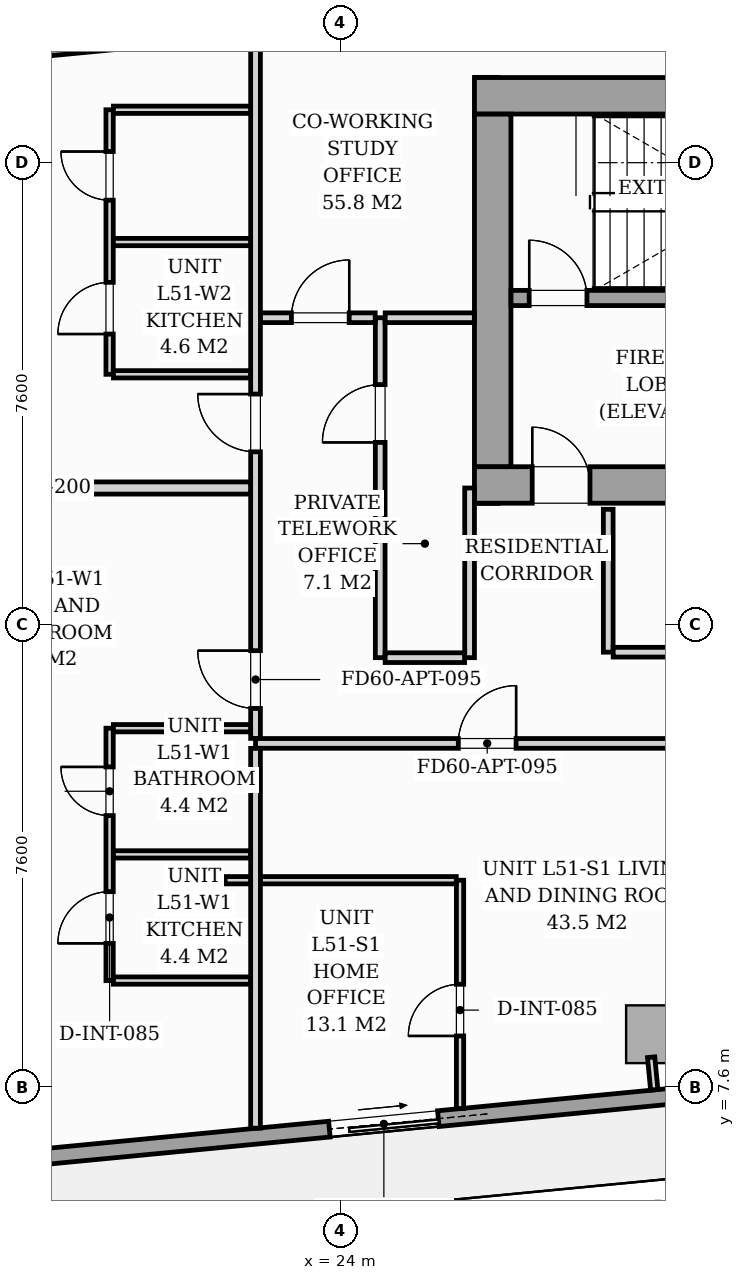
"""IFC4 building model, lengths in metres.
Left out: names, types, materials, properties, quantities, classifications, styles, units other than length and angle.
Written with IfcOpenShell. Run it as: python <this file> out.ifc"""

import sys

from ifc_helpers import new_model, si_unit, direction, frame, frame_2d, origin, origin_2d, place, context, subcontext, project, spatial, rectangle, i_section, extrude, source, transform, mapped, element, fill, save


model = new_model("IFC4")
c1 = context("Model", 3, precision=1e-05, world=origin(), true_north=direction((0.0, 1.0)))
c2 = subcontext(c1, "Body", "Model", "MODEL_VIEW")
j1 = project(units=[si_unit("LENGTHUNIT", "METRE"), si_unit("PLANEANGLEUNIT", "RADIAN")], contexts=[c1])
p1 = place(None, origin())
s1 = spatial("IfcSite", under=j1, at=p1, CompositionType="ELEMENT")
p2 = place(p1, origin())
s2 = spatial("IfcBuilding", under=s1, at=p2, CompositionType="ELEMENT")
p3 = place(p2, frame((0.0, 0.0, 179.4)))
s3 = spatial("IfcBuildingStorey", under=s2, at=p3, CompositionType="ELEMENT", Elevation=179.4)
m1 = source(origin(), c2, "Body", "SweptSolid", [
    extrude(i_section(OverallWidth=0.416, OverallDepth=0.446, WebThickness=0.039, FlangeThickness=0.063, FilletRadius=0.018, at=origin_2d()), origin(), (0.0, 0.0, 1.0), 3.196),
])
for number, where, z_axis, x_axis in (
    (1, (26.4, 17.4, 0.002), (0.0, 0.0, 1.0), (1.0, 0.0, 0.0)),
    (2, (26.4, 24.0, 0.002), (0.0, 0.0, 1.0), (1.0, 0.0, 0.0)),
):
    element("IfcColumn", number, at=place(p3, frame(where, z_axis=z_axis, x_axis=x_axis)), inside=s3, PredefinedType="PILASTER", context=c2, shape_type="MappedRepresentation", body=[
        mapped(m1, transform((0.0, 0.0, 0.0), scale=1.0)),
    ])
m2 = source(origin(), c2, "Body", "SweptSolid", [
    extrude(rectangle(XDim=0.75, YDim=0.95, at=origin_2d()), origin(), (0.0, 0.0, 1.0), 3.196),
])
p4 = place(p3, frame((29.069, 8.467, 0.002), z_axis=(0.0, 0.0, 1.0), x_axis=(0.995396198367, 0.09584575252, 0.0)))
e3 = element("IfcColumn", 3, at=p4, inside=s3, PredefinedType="COLUMN", context=c2, shape_type="MappedRepresentation", body=[
    mapped(m2, transform((0.0, 0.0, 0.0), scale=1.0)),
])
p5 = place(p3, frame((15.437, 24.324, 0.0), z_axis=(0.0, 0.0, 1.0), x_axis=(0.995395627913, 0.095851676732, 0.0)))
e4 = element("IfcWall", 4, at=p5, inside=s3, PredefinedType="STANDARD", context=c2, shape_type="SweptSolid", body=[
    extrude(rectangle(XDim=16.1, YDim=0.26, at=frame_2d((8.05, 0.0))), origin(), (0.0, 0.0, 1.0), 2.94),
])
p6 = place(p5, frame((7.589, 0.0, 0.0)))
e5 = element("IfcOpeningElement", 5, at=p6, cuts=e4, PredefinedType="OPENING", context=c2, shape_type="SweptSolid", body=[
    extrude(rectangle(XDim=1.8, YDim=2.06, at=frame_2d((0.9, 1.03))), frame((0.0, 0.14, 0.0), z_axis=(0.0, -1.0, 0.0), x_axis=(1.0, 0.0, 0.0)), (0.0, 0.0, 1.0), 0.28),
])
p7 = place(p5, frame((2.05, 0.0, 0.65)))
e6 = element("IfcOpeningElement", 6, at=p7, cuts=e4, PredefinedType="OPENING", context=c2, shape_type="SweptSolid", body=[
    extrude(rectangle(XDim=1.6, YDim=1.5, at=frame_2d((0.8, 0.75))), frame((0.0, 0.14, 0.0), z_axis=(0.0, -1.0, 0.0), x_axis=(1.0, 0.0, 0.0)), (0.0, 0.0, 1.0), 0.28),
])
p8 = place(p3, frame((33.201, 7.81, 0.0), z_axis=(0.0, 0.0, 1.0), x_axis=(-0.995397074604, -0.095836652014, 0.0)))
e7 = element("IfcWall", 7, at=p8, inside=s3, PredefinedType="STANDARD", context=c2, shape_type="SweptSolid", body=[
    extrude(rectangle(XDim=16.1, YDim=0.26, at=frame_2d((8.05, 0.0))), origin(), (0.0, 0.0, 1.0), 2.94),
])
p9 = place(p8, frame((7.63, 0.0, 0.0)))
e8 = element("IfcOpeningElement", 8, at=p9, cuts=e7, PredefinedType="OPENING", context=c2, shape_type="SweptSolid", body=[
    extrude(rectangle(XDim=1.8, YDim=2.06, at=frame_2d((0.9, 1.03))), frame((0.0, 0.14, 0.0), z_axis=(0.0, -1.0, 0.0), x_axis=(1.0, 0.0, 0.0)), (0.0, 0.0, 1.0), 0.28),
])
p10 = place(p8, frame((0.7, 0.0, 0.65)))
e9 = element("IfcOpeningElement", 9, at=p10, cuts=e7, PredefinedType="OPENING", context=c2, shape_type="SweptSolid", body=[
    extrude(rectangle(XDim=1.6, YDim=1.5, at=frame_2d((0.8, 0.75))), frame((0.0, 0.14, 0.0), z_axis=(0.0, -1.0, 0.0), x_axis=(1.0, 0.0, 0.0)), (0.0, 0.0, 1.0), 0.28),
])
p11 = place(p3, frame((26.2, 17.5, 0.0), z_axis=(0.0, 0.0, 1.0), x_axis=(1.0, 0.0, 0.0)))
e10 = element("IfcWall", 10, at=p11, inside=s3, PredefinedType="SHEAR", context=c2, shape_type="SweptSolid", body=[
    extrude(rectangle(XDim=19.6, YDim=0.6, at=frame_2d((9.8, 0.0))), origin(), (0.0, 0.0, 1.0), 3.2),
])
p12 = place(p11, frame((0.95, 0.0, 0.0)))
e11 = element("IfcOpeningElement", 11, at=p12, cuts=e10, PredefinedType="OPENING", context=c2, shape_type="SweptSolid", body=[
    extrude(rectangle(XDim=0.95, YDim=2.06, at=frame_2d((0.475, 1.03))), frame((0.0, 0.31, 0.0), z_axis=(0.0, -1.0, 0.0), x_axis=(1.0, 0.0, 0.0)), (0.0, 0.0, 1.0), 0.62),
])
p13 = place(p11, frame((9.38, 0.0, 0.0)))
e12 = element("IfcOpeningElement", 12, at=p13, cuts=e10, PredefinedType="OPENING", context=c2, shape_type="SweptSolid", body=[
    extrude(rectangle(XDim=0.85, YDim=2.0, at=frame_2d((0.425, 1.0))), frame((0.0, 0.31, 0.0), z_axis=(0.0, -1.0, 0.0), x_axis=(1.0, 0.0, 0.0)), (0.0, 0.0, 1.0), 0.62),
])
p14 = place(p11, frame((17.55, 0.0, 0.0)))
e13 = element("IfcOpeningElement", 13, at=p14, cuts=e10, PredefinedType="OPENING", context=c2, shape_type="SweptSolid", body=[
    extrude(rectangle(XDim=0.95, YDim=2.06, at=frame_2d((0.475, 1.03))), frame((0.0, 0.31, 0.0), z_axis=(0.0, -1.0, 0.0), x_axis=(1.0, 0.0, 0.0)), (0.0, 0.0, 1.0), 0.62),
])
p15 = place(p3, frame((26.2, 23.9, 0.0), z_axis=(0.0, 0.0, 1.0), x_axis=(1.0, 0.0, 0.0)))
e14 = element("IfcWall", 14, at=p15, inside=s3, PredefinedType="SHEAR", context=c2, shape_type="SweptSolid", body=[
    extrude(rectangle(XDim=19.6, YDim=0.6, at=frame_2d((9.8, 0.0))), origin(), (0.0, 0.0, 1.0), 3.2),
])
p16 = place(p3, frame((26.5, 17.802, 0.0), z_axis=(0.0, 0.0, 1.0), x_axis=(0.0, 1.0, 0.0)))
e15 = element("IfcWall", 15, at=p16, inside=s3, PredefinedType="SHEAR", context=c2, shape_type="SweptSolid", body=[
    extrude(rectangle(XDim=5.796, YDim=0.6, at=frame_2d((2.898, 0.0))), origin(), (0.0, 0.0, 1.0), 3.2),
])
p17 = place(p3, frame((26.802, 20.575, 0.0), z_axis=(0.0, 0.0, 1.0), x_axis=(1.0, 0.0, 0.0)))
e16 = element("IfcWall", 16, at=p17, inside=s3, PredefinedType="SOLIDWALL", context=c2, shape_type="SweptSolid", body=[
    extrude(rectangle(XDim=8.148, YDim=0.25, at=frame_2d((4.074, 0.0))), origin(), (0.0, 0.0, 1.0), 3.2),
])
p18 = place(p17, frame((0.298, 0.0, 0.0)))
e17 = element("IfcOpeningElement", 17, at=p18, cuts=e16, PredefinedType="OPENING", context=c2, shape_type="SweptSolid", body=[
    extrude(rectangle(XDim=0.95, YDim=2.06, at=frame_2d((0.475, 1.03))), frame((0.0, 0.135, 0.0), z_axis=(0.0, -1.0, 0.0), x_axis=(1.0, 0.0, 0.0)), (0.0, 0.0, 1.0), 0.27),
])
p19 = place(p3, frame((28.4, 14.75, 0.0), z_axis=(0.0, 0.0, 1.0), x_axis=(0.0, 1.0, 0.0)))
e18 = element("IfcWall", 18, at=p19, inside=s3, PredefinedType="PARTITIONING", context=c2, shape_type="SweptSolid", body=[
    extrude(rectangle(XDim=2.35, YDim=0.16, at=frame_2d((1.175, 0.0))), origin(), (0.0, 0.0, 1.0), 2.94),
])
p20 = place(p3, frame((28.482, 14.75, 0.0), z_axis=(0.0, 0.0, 1.0), x_axis=(1.0, 0.0, 0.0)))
e19 = element("IfcWall", 19, at=p20, inside=s3, PredefinedType="PARTITIONING", context=c2, shape_type="SweptSolid", body=[
    extrude(rectangle(XDim=4.516, YDim=0.16, at=frame_2d((2.258, 0.0))), origin(), (0.0, 0.0, 1.0), 2.94),
])
p21 = place(p20, frame((1.868, 0.0, 0.0)))
e20 = element("IfcOpeningElement", 20, at=p21, cuts=e19, PredefinedType="OPENING", context=c2, shape_type="SweptSolid", body=[
    extrude(rectangle(XDim=0.8, YDim=2.05, at=frame_2d((0.4, 1.025))), frame((0.0, 0.09, 0.0), z_axis=(0.0, -1.0, 0.0), x_axis=(1.0, 0.0, 0.0)), (0.0, 0.0, 1.0), 0.18),
])
p22 = place(p3, frame((22.6, 13.25, 0.0), z_axis=(0.0, 0.0, 1.0), x_axis=(1.0, 0.0, 0.0)))
e21 = element("IfcWall", 21, at=p22, inside=s3, PredefinedType="PARTITIONING", context=c2, shape_type="SweptSolid", body=[
    extrude(rectangle(XDim=23.28, YDim=0.16, at=frame_2d((11.64, 0.0))), origin(), (0.0, 0.0, 1.0), 2.94),
])
p23 = place(p22, frame((3.335, 0.0, 0.0)))
e22 = element("IfcOpeningElement", 22, at=p23, cuts=e21, PredefinedType="OPENING", context=c2, shape_type="SweptSolid", body=[
    extrude(rectangle(XDim=0.95, YDim=2.06, at=frame_2d((0.475, 1.03))), frame((0.0, 0.09, 0.0), z_axis=(0.0, -1.0, 0.0), x_axis=(1.0, 0.0, 0.0)), (0.0, 0.0, 1.0), 0.18),
])
p24 = place(p22, frame((15.096, 0.0, 0.0)))
e23 = element("IfcOpeningElement", 23, at=p24, cuts=e21, PredefinedType="OPENING", context=c2, shape_type="SweptSolid", body=[
    extrude(rectangle(XDim=0.95, YDim=2.06, at=frame_2d((0.475, 1.03))), frame((0.0, 0.09, 0.0), z_axis=(0.0, -1.0, 0.0), x_axis=(1.0, 0.0, 0.0)), (0.0, 0.0, 1.0), 0.18),
])
p25 = place(p3, frame((22.6, 6.922, 0.0), z_axis=(0.0, 0.0, 1.0), x_axis=(0.0, 1.0, 0.0)))
e24 = element("IfcWall", 24, at=p25, inside=s3, PredefinedType="PARTITIONING", context=c2, shape_type="SweptSolid", body=[
    extrude(rectangle(XDim=6.246, YDim=0.16, at=frame_2d((3.123, 0.0))), origin(), (0.0, 0.0, 1.0), 2.94),
])
p26 = place(p3, frame((22.6, 13.332, 0.0), z_axis=(0.0, 0.0, 1.0), x_axis=(0.0, 1.0, 0.0)))
e25 = element("IfcWall", 25, at=p26, inside=s3, PredefinedType="PARTITIONING", context=c2, shape_type="SweptSolid", body=[
    extrude(rectangle(XDim=11.549, YDim=0.16, at=frame_2d((5.774, 0.0))), origin(), (0.0, 0.0, 1.0), 2.94),
])
p27 = place(p26, frame((0.493, 0.0, 0.0)))
e26 = element("IfcOpeningElement", 26, at=p27, cuts=e25, PredefinedType="OPENING", context=c2, shape_type="SweptSolid", body=[
    extrude(rectangle(XDim=0.95, YDim=2.06, at=frame_2d((0.475, 1.03))), frame((0.0, 0.09, 0.0), z_axis=(0.0, -1.0, 0.0), x_axis=(1.0, 0.0, 0.0)), (0.0, 0.0, 1.0), 0.18),
])
p28 = place(p26, frame((4.713, 0.0, 0.0)))
e27 = element("IfcOpeningElement", 27, at=p28, cuts=e25, PredefinedType="OPENING", context=c2, shape_type="SweptSolid", body=[
    extrude(rectangle(XDim=0.95, YDim=2.06, at=frame_2d((0.475, 1.03))), frame((0.0, 0.09, 0.0), z_axis=(0.0, -1.0, 0.0), x_axis=(1.0, 0.0, 0.0)), (0.0, 0.0, 1.0), 0.18),
])
p29 = place(p3, frame((25.963, 7.246, 0.0), z_axis=(0.0, 0.0, 1.0), x_axis=(0.0, 1.0, 0.0)))
e28 = element("IfcWall", 28, at=p29, inside=s3, PredefinedType="PARTITIONING", context=c2, shape_type="SweptSolid", body=[
    extrude(rectangle(XDim=3.754, YDim=0.12, at=frame_2d((1.877, 0.0))), origin(), (0.0, 0.0, 1.0), 2.94),
])
p30 = place(p29, frame((1.193, 0.0, 0.0)))
e29 = element("IfcOpeningElement", 29, at=p30, cuts=e28, PredefinedType="OPENING", context=c2, shape_type="SweptSolid", body=[
    extrude(rectangle(XDim=0.85, YDim=2.05, at=frame_2d((0.425, 1.025))), frame((0.0, 0.07, 0.0), z_axis=(0.0, -1.0, 0.0), x_axis=(1.0, 0.0, 0.0)), (0.0, 0.0, 1.0), 0.14),
])
p31 = place(p3, frame((22.1, 11.0, 0.0), z_axis=(0.0, 0.0, 1.0), x_axis=(1.0, 0.0, 0.0)))
e30 = element("IfcWall", 30, at=p31, inside=s3, PredefinedType="PARTITIONING", context=c2, shape_type="SweptSolid", body=[
    extrude(rectangle(XDim=0.418, YDim=0.12, at=frame_2d((0.209, 0.0))), origin(), (0.0, 0.0, 1.0), 2.94),
])
p32 = place(p3, frame((22.682, 11.0, 0.0), z_axis=(0.0, 0.0, 1.0), x_axis=(1.0, 0.0, 0.0)))
e31 = element("IfcWall", 31, at=p32, inside=s3, PredefinedType="PARTITIONING", context=c2, shape_type="SweptSolid", body=[
    extrude(rectangle(XDim=3.219, YDim=0.12, at=frame_2d((1.609, 0.0))), origin(), (0.0, 0.0, 1.0), 2.94),
])
p33 = place(p3, frame((13.667, 17.45, 0.0), z_axis=(0.0, 0.0, 1.0), x_axis=(1.0, 0.0, 0.0)))
e32 = element("IfcWall", 32, at=p33, inside=s3, PredefinedType="PARTITIONING", context=c2, shape_type="SweptSolid", body=[
    extrude(rectangle(XDim=8.851, YDim=0.2, at=frame_2d((4.425, 0.0))), origin(), (0.0, 0.0, 1.0), 2.94),
])
p34 = place(p3, frame((20.2, 9.35, 0.0), z_axis=(0.0, 0.0, 1.0), x_axis=(0.0, 1.0, 0.0)))
e33 = element("IfcWall", 33, at=p34, inside=s3, PredefinedType="PARTITIONING", context=c2, shape_type="SweptSolid", body=[
    extrude(rectangle(XDim=4.15, YDim=0.12, at=frame_2d((2.075, 0.0))), origin(), (0.0, 0.0, 1.0), 2.94),
])
p35 = place(p34, frame((0.612, 0.0, 0.0)))
e34 = element("IfcOpeningElement", 34, at=p35, cuts=e33, PredefinedType="OPENING", context=c2, shape_type="SweptSolid", body=[
    extrude(rectangle(XDim=0.85, YDim=2.05, at=frame_2d((0.425, 1.025))), frame((0.0, 0.07, 0.0), z_axis=(0.0, -1.0, 0.0), x_axis=(1.0, 0.0, 0.0)), (0.0, 0.0, 1.0), 0.14),
])
p36 = place(p34, frame((2.713, 0.0, 0.0)))
e35 = element("IfcOpeningElement", 35, at=p36, cuts=e33, PredefinedType="OPENING", context=c2, shape_type="SweptSolid", body=[
    extrude(rectangle(XDim=0.8, YDim=2.02, at=frame_2d((0.4, 1.01))), frame((0.0, 0.07, 0.0), z_axis=(0.0, -1.0, 0.0), x_axis=(1.0, 0.0, 0.0)), (0.0, 0.0, 1.0), 0.14),
])
for number, where, z_axis, x_axis in (
    (36, (20.262, 11.425, 0.0), (0.0, 0.0, 1.0), (1.0, 0.0, 0.0)),
    (37, (20.262, 9.35, 0.0), (0.0, 0.0, 1.0), (1.0, 0.0, 0.0)),
    (38, (20.262, 13.5, 0.0), (0.0, 0.0, 1.0), (1.0, 0.0, 0.0)),
):
    element("IfcWall", number, at=place(p3, frame(where, z_axis=z_axis, x_axis=x_axis)), inside=s3, PredefinedType="PARTITIONING", context=c2, shape_type="SweptSolid", body=[
        extrude(rectangle(XDim=2.256, YDim=0.12, at=frame_2d((1.128, 0.0))), origin(), (0.0, 0.0, 1.0), 2.94),
    ])
p37 = place(p3, frame((20.2, 19.32, 0.0), z_axis=(0.0, 0.0, 1.0), x_axis=(0.0, 1.0, 0.0)))
e39 = element("IfcWall", 39, at=p37, inside=s3, PredefinedType="PARTITIONING", context=c2, shape_type="SweptSolid", body=[
    extrude(rectangle(XDim=4.35, YDim=0.12, at=frame_2d((2.175, 0.0))), origin(), (0.0, 0.0, 1.0), 2.94),
])
p38 = place(p37, frame((0.662, 0.0, 0.0)))
e40 = element("IfcOpeningElement", 40, at=p38, cuts=e39, PredefinedType="OPENING", context=c2, shape_type="SweptSolid", body=[
    extrude(rectangle(XDim=0.85, YDim=2.05, at=frame_2d((0.425, 1.025))), frame((0.0, 0.07, 0.0), z_axis=(0.0, -1.0, 0.0), x_axis=(1.0, 0.0, 0.0)), (0.0, 0.0, 1.0), 0.14),
])
p39 = place(p37, frame((2.863, 0.0, 0.0)))
e41 = element("IfcOpeningElement", 41, at=p39, cuts=e39, PredefinedType="OPENING", context=c2, shape_type="SweptSolid", body=[
    extrude(rectangle(XDim=0.8, YDim=2.02, at=frame_2d((0.4, 1.01))), frame((0.0, 0.07, 0.0), z_axis=(0.0, -1.0, 0.0), x_axis=(1.0, 0.0, 0.0)), (0.0, 0.0, 1.0), 0.14),
])
for number, where, z_axis, x_axis in (
    (42, (20.262, 21.495, 0.0), (0.0, 0.0, 1.0), (1.0, 0.0, 0.0)),
    (43, (20.262, 19.32, 0.0), (0.0, 0.0, 1.0), (1.0, 0.0, 0.0)),
):
    element("IfcWall", number, at=place(p3, frame(where, z_axis=z_axis, x_axis=x_axis)), inside=s3, PredefinedType="PARTITIONING", context=c2, shape_type="SweptSolid", body=[
        extrude(rectangle(XDim=2.256, YDim=0.12, at=frame_2d((1.128, 0.0))), origin(), (0.0, 0.0, 1.0), 2.94),
    ])
p40 = place(p3, frame((20.262, 23.67, 0.0), z_axis=(0.0, 0.0, 1.0), x_axis=(1.0, 0.0, 0.0)))
e44 = element("IfcWall", 44, at=p40, inside=s3, PredefinedType="PARTITIONING", context=c2, shape_type="SweptSolid", body=[
    extrude(rectangle(XDim=2.256, YDim=0.12, at=frame_2d((1.128, 0.0))), origin(), (0.0, 0.0, 1.0), 2.3),
])
p41 = place(p3, frame((24.65, 14.66, 0.0), z_axis=(0.0, 0.0, 1.0), x_axis=(0.0, 1.0, 0.0)))
e45 = element("IfcWall", 45, at=p41, inside=s3, PredefinedType="PARTITIONING", context=c2, shape_type="SweptSolid", body=[
    extrude(rectangle(XDim=5.59, YDim=0.16, at=frame_2d((2.795, 0.0))), origin(), (0.0, 0.0, 1.0), 2.94),
])
p42 = place(p41, frame((3.54, 0.0, 0.0)))
e46 = element("IfcOpeningElement", 46, at=p42, cuts=e45, PredefinedType="OPENING", context=c2, shape_type="SweptSolid", body=[
    extrude(rectangle(XDim=0.95, YDim=2.06, at=frame_2d((0.475, 1.03))), frame((0.0, 0.09, 0.0), z_axis=(0.0, -1.0, 0.0), x_axis=(1.0, 0.0, 0.0)), (0.0, 0.0, 1.0), 0.18),
])
p43 = place(p3, frame((22.682, 20.25, 0.0), z_axis=(0.0, 0.0, 1.0), x_axis=(1.0, 0.0, 0.0)))
e47 = element("IfcWall", 47, at=p43, inside=s3, PredefinedType="PARTITIONING", context=c2, shape_type="SweptSolid", body=[
    extrude(rectangle(XDim=1.886, YDim=0.16, at=frame_2d((0.943, 0.0))), origin(), (0.0, 0.0, 1.0), 2.94),
])
p44 = place(p43, frame((0.508, 0.0, 0.0)))
e48 = element("IfcOpeningElement", 48, at=p44, cuts=e47, PredefinedType="OPENING", context=c2, shape_type="SweptSolid", body=[
    extrude(rectangle(XDim=0.95, YDim=2.06, at=frame_2d((0.475, 1.03))), frame((0.0, 0.09, 0.0), z_axis=(0.0, -1.0, 0.0), x_axis=(1.0, 0.0, 0.0)), (0.0, 0.0, 1.0), 0.18),
])
p45 = place(p3, frame((24.732, 20.25, 0.0), z_axis=(0.0, 0.0, 1.0), x_axis=(1.0, 0.0, 0.0)))
e49 = element("IfcWall", 49, at=p45, inside=s3, PredefinedType="PARTITIONING", context=c2, shape_type="SweptSolid", body=[
    extrude(rectangle(XDim=1.466, YDim=0.16, at=frame_2d((0.733, 0.0))), origin(), (0.0, 0.0, 1.0), 2.94),
])
p46 = place(p3, frame((26.12, 14.66, 0.0), z_axis=(0.0, 0.0, 1.0), x_axis=(0.0, 1.0, 0.0)))
e50 = element("IfcWall", 50, at=p46, inside=s3, PredefinedType="PARTITIONING", context=c2, shape_type="SweptSolid", body=[
    extrude(rectangle(XDim=2.79, YDim=0.16, at=frame_2d((1.395, 0.0))), origin(), (0.0, 0.0, 1.0), 2.94),
])
p47 = place(p3, frame((24.732, 14.66, 0.0), z_axis=(0.0, 0.0, 1.0), x_axis=(1.0, 0.0, 0.0)))
e51 = element("IfcWall", 51, at=p47, inside=s3, PredefinedType="PARTITIONING", context=c2, shape_type="SweptSolid", body=[
    extrude(rectangle(XDim=1.306, YDim=0.16, at=frame_2d((0.653, 0.0))), origin(), (0.0, 0.0, 1.0), 2.94),
])
p48 = place(p3, frame((29.105, 8.089, 0.0), z_axis=(0.0, 0.0, 1.0), x_axis=(0.095772948675, -0.995403205893, 0.0)))
e52 = element("IfcWall", 52, at=p48, inside=s3, PredefinedType="PARTITIONING", context=c2, shape_type="SweptSolid", body=[
    extrude(rectangle(XDim=0.538, YDim=0.12, at=frame_2d((0.269, 0.0))), origin(), (0.0, 0.0, 1.0), 2.94),
])
m3 = source(origin(), c2, "Body", "SweptSolid", [
    extrude(rectangle(XDim=1.8, YDim=2.06, at=frame_2d((0.9, 1.03))), frame((0.0, 0.025, 0.0), z_axis=(0.0, -1.0, 0.0), x_axis=(1.0, 0.0, 0.0)), (0.0, 0.0, 1.0), 0.05),
])
p49 = place(p9, origin())
e53 = element("IfcDoor", 53, at=p49, inside=s3, OperationType="SLIDING_TO_LEFT", PredefinedType="DOOR", context=c2, shape_type="MappedRepresentation", body=[
    mapped(m3, transform((0.0, 0.0, 0.0), scale=1.0)),
])
fill(e8, e53)
m4 = source(origin(), c2, "Body", "SweptSolid", [
    extrude(rectangle(XDim=0.95, YDim=2.06, at=frame_2d((0.475, 1.03))), frame((0.0, 0.025, 0.0), z_axis=(0.0, -1.0, 0.0), x_axis=(1.0, 0.0, 0.0)), (0.0, 0.0, 1.0), 0.05),
])
p50 = place(p12, origin())
e54 = element("IfcDoor", 54, at=p50, inside=s3, OperationType="SINGLE_SWING_LEFT", PredefinedType="DOOR", context=c2, shape_type="MappedRepresentation", body=[
    mapped(m4, transform((0.0, 0.0, 0.0), scale=1.0)),
])
fill(e11, e54)
p51 = place(p18, origin())
e55 = element("IfcDoor", 55, at=p51, inside=s3, OperationType="SINGLE_SWING_LEFT", PredefinedType="DOOR", context=c2, shape_type="MappedRepresentation", body=[
    mapped(m4, transform((0.0, 0.0, 0.0), scale=1.0)),
])
fill(e17, e55)
m5 = source(origin(), c2, "Body", "SweptSolid", [
    extrude(rectangle(XDim=0.85, YDim=2.05, at=frame_2d((0.425, 1.025))), frame((0.0, 0.025, 0.0), z_axis=(0.0, -1.0, 0.0), x_axis=(1.0, 0.0, 0.0)), (0.0, 0.0, 1.0), 0.05),
])
p52 = place(p30, origin())
e56 = element("IfcDoor", 56, at=p52, inside=s3, OperationType="SINGLE_SWING_LEFT", PredefinedType="DOOR", context=c2, shape_type="MappedRepresentation", body=[
    mapped(m5, transform((0.0, 0.0, 0.0), scale=1.0)),
])
fill(e29, e56)
m6 = source(origin(), c2, "Body", "SweptSolid", [
    extrude(rectangle(XDim=0.95, YDim=2.06, at=frame_2d((0.475, 1.03))), frame((0.0, 0.025, 0.0), z_axis=(0.0, -1.0, 0.0), x_axis=(1.0, 0.0, 0.0)), (0.0, 0.0, 1.0), 0.05),
])
p53 = place(p23, origin())
e57 = element("IfcDoor", 57, at=p53, inside=s3, OperationType="SINGLE_SWING_RIGHT", PredefinedType="DOOR", context=c2, shape_type="MappedRepresentation", body=[
    mapped(m6, transform((0.0, 0.0, 0.0), scale=1.0)),
])
fill(e22, e57)
p54 = place(p27, origin())
e58 = element("IfcDoor", 58, at=p54, inside=s3, OperationType="SINGLE_SWING_RIGHT", PredefinedType="DOOR", context=c2, shape_type="MappedRepresentation", body=[
    mapped(m6, transform((0.0, 0.0, 0.0), scale=1.0)),
])
fill(e26, e58)
p55 = place(p35, origin())
e59 = element("IfcDoor", 59, at=p55, inside=s3, OperationType="SINGLE_SWING_LEFT", PredefinedType="DOOR", context=c2, shape_type="MappedRepresentation", body=[
    mapped(m5, transform((0.0, 0.0, 0.0), scale=1.0)),
])
fill(e34, e59)
m7 = source(origin(), c2, "Body", "SweptSolid", [
    extrude(rectangle(XDim=0.8, YDim=2.02, at=frame_2d((0.4, 1.01))), frame((0.0, 0.025, 0.0), z_axis=(0.0, -1.0, 0.0), x_axis=(1.0, 0.0, 0.0)), (0.0, 0.0, 1.0), 0.05),
])
p56 = place(p36, origin())
e60 = element("IfcDoor", 60, at=p56, inside=s3, OperationType="SINGLE_SWING_RIGHT", PredefinedType="DOOR", context=c2, shape_type="MappedRepresentation", body=[
    mapped(m7, transform((0.0, 0.0, 0.0), scale=1.0)),
])
fill(e35, e60)
p57 = place(p28, origin())
e61 = element("IfcDoor", 61, at=p57, inside=s3, OperationType="SINGLE_SWING_RIGHT", PredefinedType="DOOR", context=c2, shape_type="MappedRepresentation", body=[
    mapped(m6, transform((0.0, 0.0, 0.0), scale=1.0)),
])
fill(e27, e61)
p58 = place(p38, origin())
e62 = element("IfcDoor", 62, at=p58, inside=s3, OperationType="SINGLE_SWING_LEFT", PredefinedType="DOOR", context=c2, shape_type="MappedRepresentation", body=[
    mapped(m5, transform((0.0, 0.0, 0.0), scale=1.0)),
])
fill(e40, e62)
p59 = place(p39, origin())
e63 = element("IfcDoor", 63, at=p59, inside=s3, OperationType="SINGLE_SWING_RIGHT", PredefinedType="DOOR", context=c2, shape_type="MappedRepresentation", body=[
    mapped(m7, transform((0.0, 0.0, 0.0), scale=1.0)),
])
fill(e41, e63)
p60 = place(p42, origin())
e64 = element("IfcDoor", 64, at=p60, inside=s3, OperationType="SINGLE_SWING_LEFT", PredefinedType="DOOR", context=c2, shape_type="MappedRepresentation", body=[
    mapped(m6, transform((0.0, 0.0, 0.0), scale=1.0)),
])
fill(e46, e64)
p61 = place(p44, origin())
e65 = element("IfcDoor", 65, at=p61, inside=s3, OperationType="SINGLE_SWING_RIGHT", PredefinedType="DOOR", context=c2, shape_type="MappedRepresentation", body=[
    mapped(m6, transform((0.0, 0.0, 0.0), scale=1.0)),
])
fill(e48, e65)
save(model, sys.argv[1])
